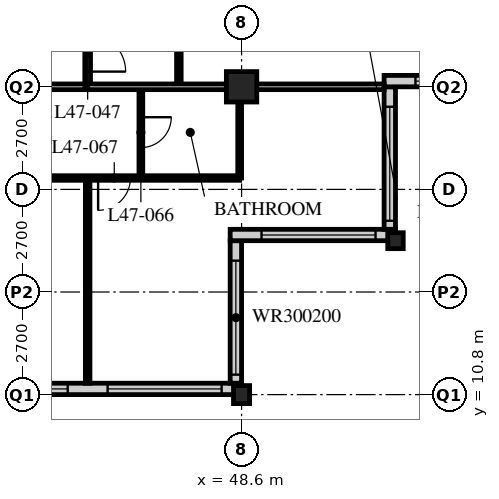
"""IFC4 building model, lengths in metres.
Left out: names, types, materials, properties, quantities, classifications, styles, units other than length and angle.
Written with IfcOpenShell. Run it as: python <this file> out.ifc"""

import sys

from ifc_helpers import new_model, si_unit, direction, frame, frame_2d, origin, origin_2d, place, context, subcontext, project, spatial, rectangle, hollow_rectangle, i_section, extrude, element, fill, save


model = new_model("IFC4")
c1 = context("Model", 3, precision=1e-05, world=origin(), true_north=direction((0.0, 1.0)))
c2 = subcontext(c1, "Body", "Model", "MODEL_VIEW")
j1 = project(units=[si_unit("LENGTHUNIT", "METRE"), si_unit("PLANEANGLEUNIT", "RADIAN")], contexts=[c1])
p1 = place(None, origin())
s1 = spatial("IfcSite", under=j1, at=p1, CompositionType="ELEMENT")
p2 = place(p1, origin())
s2 = spatial("IfcBuilding", under=s1, at=p2, CompositionType="ELEMENT")
p3 = place(p2, frame((0.0, 0.0, 184.8)))
s3 = spatial("IfcBuildingStorey", under=s2, at=p3, CompositionType="ELEMENT", Elevation=184.8)
p4 = place(p3, frame((48.6, 10.8, 0.0), z_axis=(0.0, 0.0, 1.0), x_axis=(1.0, 0.0, 0.0)))
e1 = element("IfcColumn", 1, at=p4, inside=s3, PredefinedType="COLUMN", context=c2, shape_type="SweptSolid", body=[
    extrude(i_section(OverallWidth=0.424, OverallDepth=0.475, WebThickness=0.048, FlangeThickness=0.077, FilletRadius=0.015, at=origin_2d()), origin(), (0.0, 0.0, 1.0), 3.6),
])
p5 = place(p3, frame((48.6, 18.9, 0.0), z_axis=(0.0, 0.0, 1.0), x_axis=(1.0, 0.0, 0.0)))
e2 = element("IfcColumn", 2, at=p5, inside=s3, PredefinedType="COLUMN", context=c2, shape_type="SweptSolid", body=[
    extrude(hollow_rectangle(XDim=0.8, YDim=0.8, WallThickness=0.08, at=origin_2d()), origin(), (0.0, 0.0, 1.0), 3.6),
])
p6 = place(p3, frame((52.65, 14.85, 0.0), z_axis=(0.0, 0.0, 1.0), x_axis=(1.0, 0.0, 0.0)))
e3 = element("IfcColumn", 3, at=p6, inside=s3, PredefinedType="COLUMN", context=c2, shape_type="SweptSolid", body=[
    extrude(i_section(OverallWidth=0.407, OverallDepth=0.419, WebThickness=0.031, FlangeThickness=0.049, FilletRadius=0.015, at=origin_2d()), origin(), (0.0, 0.0, 1.0), 3.6),
])
p7 = place(p3, frame((8.4, 10.95, 0.0), z_axis=(0.0, 0.0, 1.0), x_axis=(1.0, 0.0, 0.0)))
e4 = element("IfcWall", 4, at=p7, inside=s3, PredefinedType="SOLIDWALL", context=c2, shape_type="SweptSolid", body=[
    extrude(rectangle(XDim=40.2, YDim=0.3, at=frame_2d((20.1, 0.0))), origin(), (0.0, 0.0, 1.0), 3.39),
])
p8 = place(p7, frame((0.225, 0.0, 0.6)))
e5 = element("IfcOpeningElement", 5, at=p8, cuts=e4, PredefinedType="OPENING", context=c2, shape_type="SweptSolid", body=[
    extrude(rectangle(XDim=3.0, YDim=2.4, at=frame_2d((1.5, 1.2))), frame((0.0, 0.16, 0.0), z_axis=(0.0, -1.0, 0.0), x_axis=(1.0, 0.0, 0.0)), (0.0, 0.0, 1.0), 0.32),
])
p9 = place(p7, frame((4.275, 0.0, 0.6)))
e6 = element("IfcOpeningElement", 6, at=p9, cuts=e4, PredefinedType="OPENING", context=c2, shape_type="SweptSolid", body=[
    extrude(rectangle(XDim=3.0, YDim=2.4, at=frame_2d((1.5, 1.2))), frame((0.0, 0.16, 0.0), z_axis=(0.0, -1.0, 0.0), x_axis=(1.0, 0.0, 0.0)), (0.0, 0.0, 1.0), 0.32),
])
p10 = place(p7, frame((8.325, 0.0, 0.6)))
e7 = element("IfcOpeningElement", 7, at=p10, cuts=e4, PredefinedType="OPENING", context=c2, shape_type="SweptSolid", body=[
    extrude(rectangle(XDim=3.0, YDim=2.4, at=frame_2d((1.5, 1.2))), frame((0.0, 0.16, 0.0), z_axis=(0.0, -1.0, 0.0), x_axis=(1.0, 0.0, 0.0)), (0.0, 0.0, 1.0), 0.32),
])
p11 = place(p7, frame((12.375, 0.0, 0.6)))
e8 = element("IfcOpeningElement", 8, at=p11, cuts=e4, PredefinedType="OPENING", context=c2, shape_type="SweptSolid", body=[
    extrude(rectangle(XDim=3.0, YDim=2.4, at=frame_2d((1.5, 1.2))), frame((0.0, 0.16, 0.0), z_axis=(0.0, -1.0, 0.0), x_axis=(1.0, 0.0, 0.0)), (0.0, 0.0, 1.0), 0.32),
])
p12 = place(p7, frame((16.425, 0.0, 0.6)))
e9 = element("IfcOpeningElement", 9, at=p12, cuts=e4, PredefinedType="OPENING", context=c2, shape_type="SweptSolid", body=[
    extrude(rectangle(XDim=3.0, YDim=2.4, at=frame_2d((1.5, 1.2))), frame((0.0, 0.16, 0.0), z_axis=(0.0, -1.0, 0.0), x_axis=(1.0, 0.0, 0.0)), (0.0, 0.0, 1.0), 0.32),
])
p13 = place(p7, frame((20.475, 0.0, 0.6)))
e10 = element("IfcOpeningElement", 10, at=p13, cuts=e4, PredefinedType="OPENING", context=c2, shape_type="SweptSolid", body=[
    extrude(rectangle(XDim=3.0, YDim=2.4, at=frame_2d((1.5, 1.2))), frame((0.0, 0.16, 0.0), z_axis=(0.0, -1.0, 0.0), x_axis=(1.0, 0.0, 0.0)), (0.0, 0.0, 1.0), 0.32),
])
p14 = place(p7, frame((24.525, 0.0, 0.6)))
e11 = element("IfcOpeningElement", 11, at=p14, cuts=e4, PredefinedType="OPENING", context=c2, shape_type="SweptSolid", body=[
    extrude(rectangle(XDim=3.0, YDim=2.4, at=frame_2d((1.5, 1.2))), frame((0.0, 0.16, 0.0), z_axis=(0.0, -1.0, 0.0), x_axis=(1.0, 0.0, 0.0)), (0.0, 0.0, 1.0), 0.32),
])
p15 = place(p7, frame((28.575, 0.0, 0.6)))
e12 = element("IfcOpeningElement", 12, at=p15, cuts=e4, PredefinedType="OPENING", context=c2, shape_type="SweptSolid", body=[
    extrude(rectangle(XDim=3.0, YDim=2.4, at=frame_2d((1.5, 1.2))), frame((0.0, 0.16, 0.0), z_axis=(0.0, -1.0, 0.0), x_axis=(1.0, 0.0, 0.0)), (0.0, 0.0, 1.0), 0.32),
])
p16 = place(p7, frame((32.625, 0.0, 0.6)))
e13 = element("IfcOpeningElement", 13, at=p16, cuts=e4, PredefinedType="OPENING", context=c2, shape_type="SweptSolid", body=[
    extrude(rectangle(XDim=3.0, YDim=2.4, at=frame_2d((1.5, 1.2))), frame((0.0, 0.16, 0.0), z_axis=(0.0, -1.0, 0.0), x_axis=(1.0, 0.0, 0.0)), (0.0, 0.0, 1.0), 0.32),
])
p17 = place(p7, frame((36.675, 0.0, 0.6)))
e14 = element("IfcOpeningElement", 14, at=p17, cuts=e4, PredefinedType="OPENING", context=c2, shape_type="SweptSolid", body=[
    extrude(rectangle(XDim=3.0, YDim=2.4, at=frame_2d((1.5, 1.2))), frame((0.0, 0.16, 0.0), z_axis=(0.0, -1.0, 0.0), x_axis=(1.0, 0.0, 0.0)), (0.0, 0.0, 1.0), 0.32),
])
p18 = place(p3, frame((48.45, 11.1, 0.0), z_axis=(0.0, 0.0, 1.0), x_axis=(0.0, 1.0, 0.0)))
e15 = element("IfcWall", 15, at=p18, inside=s3, PredefinedType="SOLIDWALL", context=c2, shape_type="SweptSolid", body=[
    extrude(rectangle(XDim=3.75, YDim=0.3, at=frame_2d((1.875, 0.0))), origin(), (0.0, 0.0, 1.0), 3.39),
])
p19 = place(p18, frame((0.225, 0.0, 0.6)))
e16 = element("IfcOpeningElement", 16, at=p19, cuts=e15, PredefinedType="OPENING", context=c2, shape_type="SweptSolid", body=[
    extrude(rectangle(XDim=3.0, YDim=2.0, at=frame_2d((1.5, 1.0))), frame((0.0, 0.16, 0.0), z_axis=(0.0, -1.0, 0.0), x_axis=(1.0, 0.0, 0.0)), (0.0, 0.0, 1.0), 0.32),
])
p20 = place(p3, frame((48.3, 15.0, 0.0), z_axis=(0.0, 0.0, 1.0), x_axis=(1.0, 0.0, 0.0)))
e17 = element("IfcWall", 17, at=p20, inside=s3, PredefinedType="SOLIDWALL", context=c2, shape_type="SweptSolid", body=[
    extrude(rectangle(XDim=4.35, YDim=0.3, at=frame_2d((2.175, 0.0))), origin(), (0.0, 0.0, 1.0), 3.39),
])
p21 = place(p20, frame((0.825, 0.0, 0.6)))
e18 = element("IfcOpeningElement", 18, at=p21, cuts=e17, PredefinedType="OPENING", context=c2, shape_type="SweptSolid", body=[
    extrude(rectangle(XDim=3.0, YDim=2.0, at=frame_2d((1.5, 1.0))), frame((0.0, 0.16, 0.0), z_axis=(0.0, -1.0, 0.0), x_axis=(1.0, 0.0, 0.0)), (0.0, 0.0, 1.0), 0.32),
])
p22 = place(p3, frame((52.5, 15.15, 0.0), z_axis=(0.0, 0.0, 1.0), x_axis=(0.0, 1.0, 0.0)))
e19 = element("IfcWall", 19, at=p22, inside=s3, PredefinedType="SOLIDWALL", context=c2, shape_type="SweptSolid", body=[
    extrude(rectangle(XDim=3.75, YDim=0.3, at=frame_2d((1.875, 0.0))), origin(), (0.0, 0.0, 1.0), 3.39),
])
p23 = place(p22, frame((0.225, 0.0, 0.6)))
e20 = element("IfcOpeningElement", 20, at=p23, cuts=e19, PredefinedType="OPENING", context=c2, shape_type="SweptSolid", body=[
    extrude(rectangle(XDim=3.0, YDim=2.0, at=frame_2d((1.5, 1.0))), frame((0.0, 0.16, 0.0), z_axis=(0.0, -1.0, 0.0), x_axis=(1.0, 0.0, 0.0)), (0.0, 0.0, 1.0), 0.32),
])
p24 = place(p3, frame((52.35, 19.05, 0.0), z_axis=(0.0, 0.0, 1.0), x_axis=(1.0, 0.0, 0.0)))
e21 = element("IfcWall", 21, at=p24, inside=s3, PredefinedType="SOLIDWALL", context=c2, shape_type="SweptSolid", body=[
    extrude(rectangle(XDim=4.35, YDim=0.3, at=frame_2d((2.175, 0.0))), origin(), (0.0, 0.0, 1.0), 3.39),
])
p25 = place(p24, frame((0.825, 0.0, 0.6)))
e22 = element("IfcOpeningElement", 22, at=p25, cuts=e21, PredefinedType="OPENING", context=c2, shape_type="SweptSolid", body=[
    extrude(rectangle(XDim=3.0, YDim=2.0, at=frame_2d((1.5, 1.0))), frame((0.0, 0.16, 0.0), z_axis=(0.0, -1.0, 0.0), x_axis=(1.0, 0.0, 0.0)), (0.0, 0.0, 1.0), 0.32),
])
p26 = place(p3, frame((12.15, 18.9, 0.0), z_axis=(0.0, 0.0, 1.0), x_axis=(1.0, 0.0, 0.0)))
e23 = element("IfcWall", 23, at=p26, inside=s3, PredefinedType="PARTITIONING", context=c2, shape_type="SweptSolid", body=[
    extrude(rectangle(XDim=32.4, YDim=0.15, at=frame_2d((16.2, 0.0))), origin(), (0.0, 0.0, 1.0), 2.778),
])
p27 = place(p26, frame((4.95, 0.0, 0.0)))
e24 = element("IfcOpeningElement", 24, at=p27, cuts=e23, PredefinedType="OPENING", context=c2, shape_type="SweptSolid", body=[
    extrude(rectangle(XDim=1.0, YDim=2.1, at=frame_2d((0.5, 1.05))), frame((0.0, 0.085, 0.0), z_axis=(0.0, -1.0, 0.0), x_axis=(1.0, 0.0, 0.0)), (0.0, 0.0, 1.0), 0.17),
])
p28 = place(p26, frame((13.05, 0.0, 0.0)))
e25 = element("IfcOpeningElement", 25, at=p28, cuts=e23, PredefinedType="OPENING", context=c2, shape_type="SweptSolid", body=[
    extrude(rectangle(XDim=1.0, YDim=2.1, at=frame_2d((0.5, 1.05))), frame((0.0, 0.085, 0.0), z_axis=(0.0, -1.0, 0.0), x_axis=(1.0, 0.0, 0.0)), (0.0, 0.0, 1.0), 0.17),
])
p29 = place(p26, frame((21.15, 0.0, 0.0)))
e26 = element("IfcOpeningElement", 26, at=p29, cuts=e23, PredefinedType="OPENING", context=c2, shape_type="SweptSolid", body=[
    extrude(rectangle(XDim=1.0, YDim=2.1, at=frame_2d((0.5, 1.05))), frame((0.0, 0.085, 0.0), z_axis=(0.0, -1.0, 0.0), x_axis=(1.0, 0.0, 0.0)), (0.0, 0.0, 1.0), 0.17),
])
p30 = place(p26, frame((1.525, 0.0, 0.0)))
e27 = element("IfcOpeningElement", 27, at=p30, cuts=e23, PredefinedType="OPENING", context=c2, shape_type="SweptSolid", body=[
    extrude(rectangle(XDim=1.0, YDim=2.1, at=frame_2d((0.5, 1.05))), frame((0.0, 0.085, 0.0), z_axis=(0.0, -1.0, 0.0), x_axis=(1.0, 0.0, 0.0)), (0.0, 0.0, 1.0), 0.17),
])
p31 = place(p26, frame((29.875, 0.0, 0.0)))
e28 = element("IfcOpeningElement", 28, at=p31, cuts=e23, PredefinedType="OPENING", context=c2, shape_type="SweptSolid", body=[
    extrude(rectangle(XDim=1.0, YDim=2.1, at=frame_2d((0.5, 1.05))), frame((0.0, 0.085, 0.0), z_axis=(0.0, -1.0, 0.0), x_axis=(1.0, 0.0, 0.0)), (0.0, 0.0, 1.0), 0.17),
])
p32 = place(p3, frame((44.55, 18.9, 0.0), z_axis=(0.0, 0.0, 1.0), x_axis=(0.0, 1.0, 0.0)))
e29 = element("IfcWall", 29, at=p32, inside=s3, PredefinedType="PARTITIONING", context=c2, shape_type="SweptSolid", body=[
    extrude(rectangle(XDim=28.35, YDim=0.15, at=frame_2d((14.175, 0.0))), origin(), (0.0, 0.0, 1.0), 3.39),
])
p33 = place(p32, frame((0.4, 0.0, 0.0)))
e30 = element("IfcOpeningElement", 30, at=p33, cuts=e29, PredefinedType="OPENING", context=c2, shape_type="SweptSolid", body=[
    extrude(rectangle(XDim=1.0, YDim=2.1, at=frame_2d((0.5, 1.05))), frame((0.0, 0.085, 0.0), z_axis=(0.0, -1.0, 0.0), x_axis=(1.0, 0.0, 0.0)), (0.0, 0.0, 1.0), 0.17),
])
p34 = place(p32, frame((10.45, 0.0, 0.0)))
e31 = element("IfcOpeningElement", 31, at=p34, cuts=e29, PredefinedType="OPENING", context=c2, shape_type="SweptSolid", body=[
    extrude(rectangle(XDim=1.0, YDim=2.1, at=frame_2d((0.5, 1.05))), frame((0.0, 0.085, 0.0), z_axis=(0.0, -1.0, 0.0), x_axis=(1.0, 0.0, 0.0)), (0.0, 0.0, 1.0), 0.17),
])
p35 = place(p32, frame((14.5, 0.0, 0.0)))
e32 = element("IfcOpeningElement", 32, at=p35, cuts=e29, PredefinedType="OPENING", context=c2, shape_type="SweptSolid", body=[
    extrude(rectangle(XDim=1.0, YDim=2.1, at=frame_2d((0.5, 1.05))), frame((0.0, 0.085, 0.0), z_axis=(0.0, -1.0, 0.0), x_axis=(1.0, 0.0, 0.0)), (0.0, 0.0, 1.0), 0.17),
])
p36 = place(p32, frame((16.6, 0.0, 0.0)))
e33 = element("IfcOpeningElement", 33, at=p36, cuts=e29, PredefinedType="OPENING", context=c2, shape_type="SweptSolid", body=[
    extrude(rectangle(XDim=1.0, YDim=2.1, at=frame_2d((0.5, 1.05))), frame((0.0, 0.085, 0.0), z_axis=(0.0, -1.0, 0.0), x_axis=(1.0, 0.0, 0.0)), (0.0, 0.0, 1.0), 0.17),
])
p37 = place(p32, frame((26.65, 0.0, 0.0)))
e34 = element("IfcOpeningElement", 34, at=p37, cuts=e29, PredefinedType="OPENING", context=c2, shape_type="SweptSolid", body=[
    extrude(rectangle(XDim=1.0, YDim=2.1, at=frame_2d((0.5, 1.05))), frame((0.0, 0.085, 0.0), z_axis=(0.0, -1.0, 0.0), x_axis=(1.0, 0.0, 0.0)), (0.0, 0.0, 1.0), 0.17),
])
p38 = place(p3, frame((46.95, 18.9, 0.0), z_axis=(0.0, 0.0, 1.0), x_axis=(0.0, 1.0, 0.0)))
e35 = element("IfcWall", 35, at=p38, inside=s3, PredefinedType="PARTITIONING", context=c2, shape_type="SweptSolid", body=[
    extrude(rectangle(XDim=8.1, YDim=0.12, at=frame_2d((4.05, 0.0))), origin(), (0.0, 0.0, 1.0), 3.39),
])
p39 = place(p38, frame((0.975, 0.0, 0.0)))
e36 = element("IfcOpeningElement", 36, at=p39, cuts=e35, PredefinedType="OPENING", context=c2, shape_type="SweptSolid", body=[
    extrude(rectangle(XDim=0.85, YDim=2.1, at=frame_2d((0.425, 1.05))), frame((0.0, 0.07, 0.0), z_axis=(0.0, -1.0, 0.0), x_axis=(1.0, 0.0, 0.0)), (0.0, 0.0, 1.0), 0.14),
])
p40 = place(p38, frame((4.375, 0.0, 0.0)))
e37 = element("IfcOpeningElement", 37, at=p40, cuts=e35, PredefinedType="OPENING", context=c2, shape_type="SweptSolid", body=[
    extrude(rectangle(XDim=0.85, YDim=2.1, at=frame_2d((0.425, 1.05))), frame((0.0, 0.07, 0.0), z_axis=(0.0, -1.0, 0.0), x_axis=(1.0, 0.0, 0.0)), (0.0, 0.0, 1.0), 0.14),
])
p41 = place(p3, frame((8.15, 16.5, 0.0), z_axis=(0.0, 0.0, 1.0), x_axis=(1.0, 0.0, 0.0)))
e38 = element("IfcWall", 38, at=p41, inside=s3, PredefinedType="PARTITIONING", context=c2, shape_type="SweptSolid", body=[
    extrude(rectangle(XDim=40.4, YDim=0.12, at=frame_2d((20.2, 0.0))), origin(), (0.0, 0.0, 1.0), 3.39),
])
p42 = place(p41, frame((9.025, 0.0, 0.0)))
e39 = element("IfcOpeningElement", 39, at=p42, cuts=e38, PredefinedType="OPENING", context=c2, shape_type="SweptSolid", body=[
    extrude(rectangle(XDim=0.85, YDim=2.1, at=frame_2d((0.425, 1.05))), frame((0.0, 0.07, 0.0), z_axis=(0.0, -1.0, 0.0), x_axis=(1.0, 0.0, 0.0)), (0.0, 0.0, 1.0), 0.14),
])
p43 = place(p41, frame((12.425, 0.0, 0.0)))
e40 = element("IfcOpeningElement", 40, at=p43, cuts=e38, PredefinedType="OPENING", context=c2, shape_type="SweptSolid", body=[
    extrude(rectangle(XDim=0.85, YDim=2.1, at=frame_2d((0.425, 1.05))), frame((0.0, 0.07, 0.0), z_axis=(0.0, -1.0, 0.0), x_axis=(1.0, 0.0, 0.0)), (0.0, 0.0, 1.0), 0.14),
])
p44 = place(p41, frame((17.125, 0.0, 0.0)))
e41 = element("IfcOpeningElement", 41, at=p44, cuts=e38, PredefinedType="OPENING", context=c2, shape_type="SweptSolid", body=[
    extrude(rectangle(XDim=0.85, YDim=2.1, at=frame_2d((0.425, 1.05))), frame((0.0, 0.07, 0.0), z_axis=(0.0, -1.0, 0.0), x_axis=(1.0, 0.0, 0.0)), (0.0, 0.0, 1.0), 0.14),
])
p45 = place(p41, frame((20.525, 0.0, 0.0)))
e42 = element("IfcOpeningElement", 42, at=p45, cuts=e38, PredefinedType="OPENING", context=c2, shape_type="SweptSolid", body=[
    extrude(rectangle(XDim=0.85, YDim=2.1, at=frame_2d((0.425, 1.05))), frame((0.0, 0.07, 0.0), z_axis=(0.0, -1.0, 0.0), x_axis=(1.0, 0.0, 0.0)), (0.0, 0.0, 1.0), 0.14),
])
p46 = place(p41, frame((25.225, 0.0, 0.0)))
e43 = element("IfcOpeningElement", 43, at=p46, cuts=e38, PredefinedType="OPENING", context=c2, shape_type="SweptSolid", body=[
    extrude(rectangle(XDim=0.85, YDim=2.1, at=frame_2d((0.425, 1.05))), frame((0.0, 0.07, 0.0), z_axis=(0.0, -1.0, 0.0), x_axis=(1.0, 0.0, 0.0)), (0.0, 0.0, 1.0), 0.14),
])
p47 = place(p41, frame((28.625, 0.0, 0.0)))
e44 = element("IfcOpeningElement", 44, at=p47, cuts=e38, PredefinedType="OPENING", context=c2, shape_type="SweptSolid", body=[
    extrude(rectangle(XDim=0.85, YDim=2.1, at=frame_2d((0.425, 1.05))), frame((0.0, 0.07, 0.0), z_axis=(0.0, -1.0, 0.0), x_axis=(1.0, 0.0, 0.0)), (0.0, 0.0, 1.0), 0.14),
])
p48 = place(p41, frame((6.725, 0.0, 0.0)))
e45 = element("IfcOpeningElement", 45, at=p48, cuts=e38, PredefinedType="OPENING", context=c2, shape_type="SweptSolid", body=[
    extrude(rectangle(XDim=0.85, YDim=2.1, at=frame_2d((0.425, 1.05))), frame((0.0, 0.07, 0.0), z_axis=(0.0, -1.0, 0.0), x_axis=(1.0, 0.0, 0.0)), (0.0, 0.0, 1.0), 0.14),
])
p49 = place(p41, frame((2.875, 0.0, 0.0)))
e46 = element("IfcOpeningElement", 46, at=p49, cuts=e38, PredefinedType="OPENING", context=c2, shape_type="SweptSolid", body=[
    extrude(rectangle(XDim=0.85, YDim=2.1, at=frame_2d((0.425, 1.05))), frame((0.0, 0.07, 0.0), z_axis=(0.0, -1.0, 0.0), x_axis=(1.0, 0.0, 0.0)), (0.0, 0.0, 1.0), 0.14),
])
p50 = place(p41, frame((32.825, 0.0, 0.0)))
e47 = element("IfcOpeningElement", 47, at=p50, cuts=e38, PredefinedType="OPENING", context=c2, shape_type="SweptSolid", body=[
    extrude(rectangle(XDim=0.85, YDim=2.1, at=frame_2d((0.425, 1.05))), frame((0.0, 0.07, 0.0), z_axis=(0.0, -1.0, 0.0), x_axis=(1.0, 0.0, 0.0)), (0.0, 0.0, 1.0), 0.14),
])
p51 = place(p41, frame((36.675, 0.0, 0.0)))
e48 = element("IfcOpeningElement", 48, at=p51, cuts=e38, PredefinedType="OPENING", context=c2, shape_type="SweptSolid", body=[
    extrude(rectangle(XDim=0.85, YDim=2.1, at=frame_2d((0.425, 1.05))), frame((0.0, 0.07, 0.0), z_axis=(0.0, -1.0, 0.0), x_axis=(1.0, 0.0, 0.0)), (0.0, 0.0, 1.0), 0.14),
])
p52 = place(p3, frame((45.95, 18.9, 0.0), z_axis=(0.0, 0.0, 1.0), x_axis=(0.0, -1.0, 0.0)))
e49 = element("IfcWall", 49, at=p52, inside=s3, PredefinedType="PARTITIONING", context=c2, shape_type="SweptSolid", body=[
    extrude(rectangle(XDim=2.4, YDim=0.1, at=frame_2d((1.2, 0.0))), origin(), (0.0, 0.0, 1.0), 3.39),
])
p53 = place(p52, frame((0.8, 0.0, 0.0)))
e50 = element("IfcOpeningElement", 50, at=p53, cuts=e49, PredefinedType="OPENING", context=c2, shape_type="SweptSolid", body=[
    extrude(rectangle(XDim=0.8, YDim=2.1, at=frame_2d((0.4, 1.05))), frame((0.0, 0.06, 0.0), z_axis=(0.0, -1.0, 0.0), x_axis=(1.0, 0.0, 0.0)), (0.0, 0.0, 1.0), 0.12),
])
p54 = place(p3, frame((48.55, 18.9, 0.0), z_axis=(0.0, 0.0, 1.0), x_axis=(0.0, -1.0, 0.0)))
e51 = element("IfcWall", 51, at=p54, inside=s3, PredefinedType="PARTITIONING", context=c2, shape_type="SweptSolid", body=[
    extrude(rectangle(XDim=2.4, YDim=0.1, at=frame_2d((1.2, 0.0))), origin(), (0.0, 0.0, 1.0), 2.778),
])
p55 = place(p3, frame((44.55, 16.5, 0.0), z_axis=(0.0, 0.0, 1.0), x_axis=(0.0, -1.0, 0.0)))
e52 = element("IfcWall", 52, at=p55, inside=s3, PredefinedType="PARTITIONING", context=c2, shape_type="SweptSolid", body=[
    extrude(rectangle(XDim=5.4, YDim=0.12, at=frame_2d((2.7, 0.0))), origin(), (0.0, 0.0, 1.0), 3.39),
])
p56 = place(p3, frame((44.55, 18.9, 0.0), z_axis=(0.0, 0.0, 1.0), x_axis=(1.0, 0.0, 0.0)))
e53 = element("IfcWall", 53, at=p56, inside=s3, PredefinedType="PARTITIONING", context=c2, shape_type="SweptSolid", body=[
    extrude(rectangle(XDim=7.8, YDim=0.15, at=frame_2d((3.9, 0.0))), origin(), (0.0, 0.0, 1.0), 2.778),
])
p57 = place(p16, origin())
e54 = element("IfcWindow", 54, at=p57, inside=s3, PartitioningType="SINGLE_PANEL", PredefinedType="WINDOW", context=c2, shape_type="SweptSolid", body=[
    extrude(rectangle(XDim=3.0, YDim=2.4, at=frame_2d((1.5, 1.2))), frame((0.0, 0.03, 0.0), z_axis=(0.0, -1.0, 0.0), x_axis=(1.0, 0.0, 0.0)), (0.0, 0.0, 1.0), 0.06),
])
fill(e13, e54)
p58 = place(p17, origin())
e55 = element("IfcWindow", 55, at=p58, inside=s3, PartitioningType="SINGLE_PANEL", PredefinedType="WINDOW", context=c2, shape_type="SweptSolid", body=[
    extrude(rectangle(XDim=3.0, YDim=2.4, at=frame_2d((1.5, 1.2))), frame((0.0, 0.03, 0.0), z_axis=(0.0, -1.0, 0.0), x_axis=(1.0, 0.0, 0.0)), (0.0, 0.0, 1.0), 0.06),
])
fill(e14, e55)
p59 = place(p19, origin())
e56 = element("IfcWindow", 56, at=p59, inside=s3, PartitioningType="SINGLE_PANEL", PredefinedType="WINDOW", context=c2, shape_type="SweptSolid", body=[
    extrude(rectangle(XDim=3.0, YDim=2.0, at=frame_2d((1.5, 1.0))), frame((0.0, 0.03, 0.0), z_axis=(0.0, -1.0, 0.0), x_axis=(1.0, 0.0, 0.0)), (0.0, 0.0, 1.0), 0.06),
])
fill(e16, e56)
p60 = place(p21, origin())
e57 = element("IfcWindow", 57, at=p60, inside=s3, PartitioningType="SINGLE_PANEL", PredefinedType="WINDOW", context=c2, shape_type="SweptSolid", body=[
    extrude(rectangle(XDim=3.0, YDim=2.0, at=frame_2d((1.5, 1.0))), frame((0.0, 0.03, 0.0), z_axis=(0.0, -1.0, 0.0), x_axis=(1.0, 0.0, 0.0)), (0.0, 0.0, 1.0), 0.06),
])
fill(e18, e57)
p61 = place(p23, origin())
e58 = element("IfcWindow", 58, at=p61, inside=s3, PartitioningType="SINGLE_PANEL", PredefinedType="WINDOW", context=c2, shape_type="SweptSolid", body=[
    extrude(rectangle(XDim=3.0, YDim=2.0, at=frame_2d((1.5, 1.0))), frame((0.0, 0.03, 0.0), z_axis=(0.0, -1.0, 0.0), x_axis=(1.0, 0.0, 0.0)), (0.0, 0.0, 1.0), 0.06),
])
fill(e20, e58)
p62 = place(p25, origin())
e59 = element("IfcWindow", 59, at=p62, inside=s3, PartitioningType="SINGLE_PANEL", PredefinedType="WINDOW", context=c2, shape_type="SweptSolid", body=[
    extrude(rectangle(XDim=3.0, YDim=2.0, at=frame_2d((1.5, 1.0))), frame((0.0, 0.03, 0.0), z_axis=(0.0, -1.0, 0.0), x_axis=(1.0, 0.0, 0.0)), (0.0, 0.0, 1.0), 0.06),
])
fill(e22, e59)
p63 = place(p33, origin())
e60 = element("IfcDoor", 60, at=p63, inside=s3, OperationType="SINGLE_SWING_RIGHT", PredefinedType="DOOR", context=c2, shape_type="SweptSolid", body=[
    extrude(rectangle(XDim=1.0, YDim=2.1, at=frame_2d((0.5, 1.05))), frame((0.0, 0.025, 0.0), z_axis=(0.0, -1.0, 0.0), x_axis=(1.0, 0.0, 0.0)), (0.0, 0.0, 1.0), 0.05),
])
fill(e30, e60)
p64 = place(p53, origin())
e61 = element("IfcDoor", 61, at=p64, inside=s3, OperationType="SINGLE_SWING_LEFT", PredefinedType="DOOR", context=c2, shape_type="SweptSolid", body=[
    extrude(rectangle(XDim=0.8, YDim=2.1, at=frame_2d((0.4, 1.05))), frame((0.0, 0.025, 0.0), z_axis=(0.0, -1.0, 0.0), x_axis=(1.0, 0.0, 0.0)), (0.0, 0.0, 1.0), 0.05),
])
fill(e50, e61)
p65 = place(p51, origin())
e62 = element("IfcDoor", 62, at=p65, inside=s3, OperationType="SINGLE_SWING_RIGHT", PredefinedType="DOOR", context=c2, shape_type="SweptSolid", body=[
    extrude(rectangle(XDim=0.85, YDim=2.1, at=frame_2d((0.425, 1.05))), frame((0.0, 0.025, 0.0), z_axis=(0.0, -1.0, 0.0), x_axis=(1.0, 0.0, 0.0)), (0.0, 0.0, 1.0), 0.05),
])
fill(e48, e62)
save(model, sys.argv[1])
